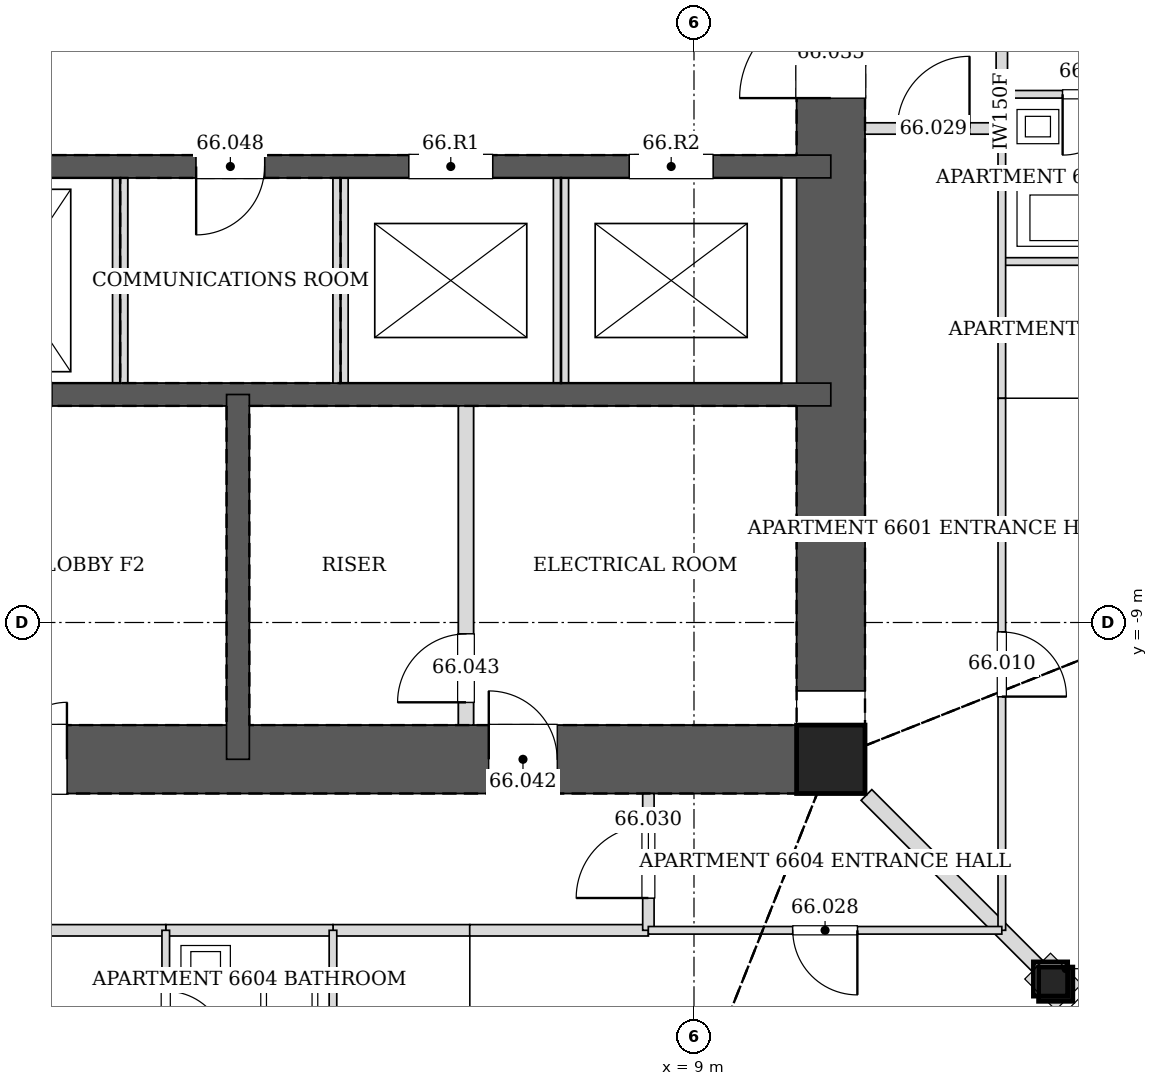
"""IFC4 building model, lengths in metres.
Left out: names, types, materials, properties, quantities, classifications, styles, units other than length and angle.
Written with IfcOpenShell. Run it as: python <this file> out.ifc"""

import sys

from ifc_helpers import new_model, si_unit, direction, frame, frame_2d, origin, origin_2d, place, context, subcontext, project, spatial, rectangle, hollow_rectangle, extrude, element, fill, save


model = new_model("IFC4")
c1 = context("Model", 3, precision=1e-05, world=origin(), true_north=direction((0.0, 1.0)))
c2 = subcontext(c1, "Body", "Model", "MODEL_VIEW")
j1 = project(units=[si_unit("LENGTHUNIT", "METRE"), si_unit("PLANEANGLEUNIT", "RADIAN")], contexts=[c1])
p1 = place(None, origin())
s1 = spatial("IfcSite", under=j1, at=p1, CompositionType="ELEMENT")
p2 = place(p1, origin())
s2 = spatial("IfcBuilding", under=s1, at=p2, CompositionType="ELEMENT")
p3 = place(p2, frame((0.0, 0.0, 274.2)))
s3 = spatial("IfcBuildingStorey", under=s2, at=p3, CompositionType="ELEMENT", Elevation=274.2)
p4 = place(p3, frame((13.759, -13.759, 0.0), z_axis=(-0.019953277583, 0.019953277583, 0.999601787427), x_axis=(-0.707106781187, -0.707106781187, 0.0)))
e1 = element("IfcColumn", 1, at=p4, inside=s3, PredefinedType="COLUMN", context=c2, shape_type="SweptSolid", body=[
    extrude(hollow_rectangle(XDim=0.45, YDim=0.45, WallThickness=0.02, at=origin_2d()), origin(), (0.0, 0.0, 1.0), 3.402),
])
p5 = place(p3, frame((10.8, -10.8, 0.0), z_axis=(0.0, 0.0, 1.0), x_axis=(1.0, 0.0, 0.0)))
e2 = element("IfcColumn", 2, at=p5, inside=s3, PredefinedType="COLUMN", context=c2, shape_type="SweptSolid", body=[
    extrude(hollow_rectangle(XDim=0.9, YDim=0.9, WallThickness=0.04, at=origin_2d()), origin(), (0.0, 0.0, 1.0), 3.4),
])
p6 = place(p3, frame((-10.8, -10.8, 0.0), z_axis=(0.0, 0.0, 1.0), x_axis=(1.0, 0.0, 0.0)))
e3 = element("IfcWall", 3, at=p6, inside=s3, PredefinedType="SOLIDWALL", context=c2, shape_type="SweptSolid", body=[
    extrude(rectangle(XDim=21.6, YDim=0.9, at=frame_2d((10.8, 0.0))), origin(), (0.0, 0.0, 1.0), 3.4),
])
p7 = place(p6, frame((10.05, 0.0, 0.0)))
e4 = element("IfcOpeningElement", 4, at=p7, cuts=e3, PredefinedType="OPENING", context=c2, shape_type="SweptSolid", body=[
    extrude(rectangle(XDim=1.5, YDim=2.1, at=frame_2d((0.75, 1.05))), frame((0.0, 0.46, 0.0), z_axis=(0.0, -1.0, 0.0), x_axis=(1.0, 0.0, 0.0)), (0.0, 0.0, 1.0), 0.92),
])
p8 = place(p6, frame((17.1, 0.0, 0.0)))
e5 = element("IfcOpeningElement", 5, at=p8, cuts=e3, PredefinedType="OPENING", context=c2, shape_type="SweptSolid", body=[
    extrude(rectangle(XDim=0.9, YDim=2.1, at=frame_2d((0.45, 1.05))), frame((0.0, 0.46, 0.0), z_axis=(0.0, -1.0, 0.0), x_axis=(1.0, 0.0, 0.0)), (0.0, 0.0, 1.0), 0.92),
])
p9 = place(p3, frame((10.8, -10.8, 0.0), z_axis=(0.0, 0.0, 1.0), x_axis=(0.0, 1.0, 0.0)))
e6 = element("IfcWall", 6, at=p9, inside=s3, PredefinedType="SOLIDWALL", context=c2, shape_type="SweptSolid", body=[
    extrude(rectangle(XDim=21.6, YDim=0.9, at=frame_2d((10.8, 0.0))), origin(), (0.0, 0.0, 1.0), 3.4),
])
p10 = place(p9, frame((11.7, 0.0, 0.0)))
e7 = element("IfcOpeningElement", 7, at=p10, cuts=e6, PredefinedType="OPENING", context=c2, shape_type="SweptSolid", body=[
    extrude(rectangle(XDim=1.2, YDim=2.1, at=frame_2d((0.6, 1.05))), frame((0.0, 0.46, 0.0), z_axis=(0.0, -1.0, 0.0), x_axis=(1.0, 0.0, 0.0)), (0.0, 0.0, 1.0), 0.92),
])
p11 = place(p9, frame((8.7, 0.0, 0.0)))
e8 = element("IfcOpeningElement", 8, at=p11, cuts=e6, PredefinedType="OPENING", context=c2, shape_type="SweptSolid", body=[
    extrude(rectangle(XDim=1.2, YDim=2.1, at=frame_2d((0.6, 1.05))), frame((0.0, 0.46, 0.0), z_axis=(0.0, -1.0, 0.0), x_axis=(1.0, 0.0, 0.0)), (0.0, 0.0, 1.0), 0.92),
])
p12 = place(p3, frame((-10.8, -3.0, 0.0), z_axis=(0.0, 0.0, 1.0), x_axis=(1.0, 0.0, 0.0)))
e9 = element("IfcWall", 9, at=p12, inside=s3, PredefinedType="SOLIDWALL", context=c2, shape_type="SweptSolid", body=[
    extrude(rectangle(XDim=21.6, YDim=0.3, at=frame_2d((10.8, 0.0))), origin(), (0.0, 0.0, 1.0), 3.4),
])
p13 = place(p12, frame((13.25, 0.0, 0.0)))
e10 = element("IfcOpeningElement", 10, at=p13, cuts=e9, PredefinedType="OPENING", context=c2, shape_type="SweptSolid", body=[
    extrude(rectangle(XDim=0.9, YDim=2.1, at=frame_2d((0.45, 1.05))), frame((0.0, 0.16, 0.0), z_axis=(0.0, -1.0, 0.0), x_axis=(1.0, 0.0, 0.0)), (0.0, 0.0, 1.0), 0.32),
])
p14 = place(p12, frame((1.65, 0.0, 0.0)))
e11 = element("IfcOpeningElement", 11, at=p14, cuts=e9, PredefinedType="OPENING", context=c2, shape_type="SweptSolid", body=[
    extrude(rectangle(XDim=0.9, YDim=2.1, at=frame_2d((0.45, 1.05))), frame((0.0, 0.16, 0.0), z_axis=(0.0, -1.0, 0.0), x_axis=(1.0, 0.0, 0.0)), (0.0, 0.0, 1.0), 0.32),
])
p15 = place(p12, frame((4.55, 0.0, 0.0)))
e12 = element("IfcOpeningElement", 12, at=p15, cuts=e9, PredefinedType="OPENING", context=c2, shape_type="SweptSolid", body=[
    extrude(rectangle(XDim=0.9, YDim=2.1, at=frame_2d((0.45, 1.05))), frame((0.0, 0.16, 0.0), z_axis=(0.0, -1.0, 0.0), x_axis=(1.0, 0.0, 0.0)), (0.0, 0.0, 1.0), 0.32),
])
p16 = place(p12, frame((7.45, 0.0, 0.0)))
e13 = element("IfcOpeningElement", 13, at=p16, cuts=e9, PredefinedType="OPENING", context=c2, shape_type="SweptSolid", body=[
    extrude(rectangle(XDim=0.9, YDim=2.1, at=frame_2d((0.45, 1.05))), frame((0.0, 0.16, 0.0), z_axis=(0.0, -1.0, 0.0), x_axis=(1.0, 0.0, 0.0)), (0.0, 0.0, 1.0), 0.32),
])
p17 = place(p12, frame((16.05, 0.0, 0.0)))
e14 = element("IfcOpeningElement", 14, at=p17, cuts=e9, PredefinedType="OPENING", context=c2, shape_type="SweptSolid", body=[
    extrude(rectangle(XDim=1.1, YDim=2.1, at=frame_2d((0.55, 1.05))), frame((0.0, 0.16, 0.0), z_axis=(0.0, -1.0, 0.0), x_axis=(1.0, 0.0, 0.0)), (0.0, 0.0, 1.0), 0.32),
])
p18 = place(p12, frame((18.95, 0.0, 0.0)))
e15 = element("IfcOpeningElement", 15, at=p18, cuts=e9, PredefinedType="OPENING", context=c2, shape_type="SweptSolid", body=[
    extrude(rectangle(XDim=1.1, YDim=2.1, at=frame_2d((0.55, 1.05))), frame((0.0, 0.16, 0.0), z_axis=(0.0, -1.0, 0.0), x_axis=(1.0, 0.0, 0.0)), (0.0, 0.0, 1.0), 0.32),
])
p19 = place(p3, frame((-10.8, -6.0, 0.0), z_axis=(0.0, 0.0, 1.0), x_axis=(1.0, 0.0, 0.0)))
e16 = element("IfcWall", 16, at=p19, inside=s3, PredefinedType="SOLIDWALL", context=c2, shape_type="SweptSolid", body=[
    extrude(rectangle(XDim=21.6, YDim=0.3, at=frame_2d((10.8, 0.0))), origin(), (0.0, 0.0, 1.0), 3.4),
])
p20 = place(p19, frame((10.25, 0.0, 0.0)))
e17 = element("IfcOpeningElement", 17, at=p20, cuts=e16, PredefinedType="OPENING", context=c2, shape_type="SweptSolid", body=[
    extrude(rectangle(XDim=1.1, YDim=2.1, at=frame_2d((0.55, 1.05))), frame((0.0, 0.16, 0.0), z_axis=(0.0, -1.0, 0.0), x_axis=(1.0, 0.0, 0.0)), (0.0, 0.0, 1.0), 0.32),
])
p21 = place(p3, frame((3.0, -6.0, 0.0), z_axis=(0.0, 0.0, 1.0), x_axis=(0.0, -1.0, 0.0)))
e18 = element("IfcWall", 18, at=p21, inside=s3, PredefinedType="SOLIDWALL", context=c2, shape_type="SweptSolid", body=[
    extrude(rectangle(XDim=4.8, YDim=0.3, at=frame_2d((2.4, 0.0))), origin(), (0.0, 0.0, 1.0), 3.4),
])
p22 = place(p3, frame((13.05, -2.5, 0.0), z_axis=(0.0, 0.0, 1.0), x_axis=(0.0, 1.0, 0.0)))
e19 = element("IfcWall", 19, at=p22, inside=s3, PredefinedType="PARTITIONING", context=c2, shape_type="SweptSolid", body=[
    extrude(rectangle(XDim=0.451, YDim=0.15, at=frame_2d((0.226, 0.0))), origin(), (0.0, 0.0, 1.0), 3.2),
])
p23 = place(p3, frame((13.05, -2.051, 0.0), z_axis=(0.0, 0.0, 1.0), x_axis=(0.0, 1.0, 0.0)))
e20 = element("IfcWall", 20, at=p23, inside=s3, PredefinedType="PARTITIONING", context=c2, shape_type="SweptSolid", body=[
    extrude(rectangle(XDim=9.602, YDim=0.15, at=frame_2d((4.801, 0.0))), origin(), (0.0, 0.0, 1.0), 2.344),
])
p24 = place(p3, frame((11.25, -2.5, 0.0), z_axis=(0.0, 0.0, 1.0), x_axis=(1.0, 0.0, 0.0)))
e21 = element("IfcWall", 21, at=p24, inside=s3, PredefinedType="PARTITIONING", context=c2, shape_type="SweptSolid", body=[
    extrude(rectangle(XDim=1.8, YDim=0.15, at=frame_2d((0.9, 0.0))), origin(), (0.0, 0.0, 1.0), 3.2),
])
p25 = place(p24, frame((0.425, 0.0, 0.0)))
e22 = element("IfcOpeningElement", 22, at=p25, cuts=e21, PredefinedType="OPENING", context=c2, shape_type="SweptSolid", body=[
    extrude(rectangle(XDim=0.95, YDim=2.1, at=frame_2d((0.475, 1.05))), frame((0.0, 0.085, 0.0), z_axis=(0.0, -1.0, 0.0), x_axis=(1.0, 0.0, 0.0)), (0.0, 0.0, 1.0), 0.17),
])
p26 = place(p3, frame((4.249, -13.05, 0.0), z_axis=(0.0, 0.0, 1.0), x_axis=(1.0, 0.0, 0.0)))
e23 = element("IfcWall", 23, at=p26, inside=s3, PredefinedType="PARTITIONING", context=c2, shape_type="SweptSolid", body=[
    extrude(rectangle(XDim=1.802, YDim=0.15, at=frame_2d((0.901, 0.0))), origin(), (0.0, 0.0, 1.0), 3.2),
])
p27 = place(p3, frame((2.049, -13.05, 0.0), z_axis=(0.0, 0.0, 1.0), x_axis=(1.0, 0.0, 0.0)))
e24 = element("IfcWall", 24, at=p27, inside=s3, PredefinedType="PARTITIONING", context=c2, shape_type="SweptSolid", body=[
    extrude(rectangle(XDim=2.202, YDim=0.15, at=frame_2d((1.101, 0.0))), origin(), (0.0, 0.0, 1.0), 3.2),
])
p28 = place(p3, frame((-7.551, -13.05, 0.0), z_axis=(0.0, 0.0, 1.0), x_axis=(1.0, 0.0, 0.0)))
e25 = element("IfcWall", 25, at=p28, inside=s3, PredefinedType="PARTITIONING", context=c2, shape_type="SweptSolid", body=[
    extrude(rectangle(XDim=9.602, YDim=0.15, at=frame_2d((4.801, 0.0))), origin(), (0.0, 0.0, 1.0), 2.344),
])
p29 = place(p3, frame((6.049, -13.05, 0.0), z_axis=(0.0, 0.0, 1.0), x_axis=(1.0, 0.0, 0.0)))
e26 = element("IfcWall", 26, at=p29, inside=s3, PredefinedType="PARTITIONING", context=c2, shape_type="SweptSolid", body=[
    extrude(rectangle(XDim=2.351, YDim=0.15, at=frame_2d((1.175, 0.0))), origin(), (0.0, 0.0, 1.0), 3.2),
])
p30 = place(p3, frame((8.4, -13.05, 0.0), z_axis=(0.0, 0.0, 1.0), x_axis=(0.0, 1.0, 0.0)))
e27 = element("IfcWall", 27, at=p30, inside=s3, PredefinedType="PARTITIONING", context=c2, shape_type="SweptSolid", body=[
    extrude(rectangle(XDim=1.8, YDim=0.15, at=frame_2d((0.9, 0.0))), origin(), (0.0, 0.0, 1.0), 3.2),
])
p31 = place(p30, frame((0.425, 0.0, 0.0)))
e28 = element("IfcOpeningElement", 28, at=p31, cuts=e27, PredefinedType="OPENING", context=c2, shape_type="SweptSolid", body=[
    extrude(rectangle(XDim=0.95, YDim=2.1, at=frame_2d((0.475, 1.05))), frame((0.0, 0.085, 0.0), z_axis=(0.0, -1.0, 0.0), x_axis=(1.0, 0.0, 0.0)), (0.0, 0.0, 1.0), 0.17),
])
p32 = place(p3, frame((15.45, -4.25, 0.0), z_axis=(0.0, 0.0, 1.0), x_axis=(-1.0, 0.0, 0.0)))
e29 = element("IfcWall", 29, at=p32, inside=s3, PredefinedType="PARTITIONING", context=c2, shape_type="SweptSolid", body=[
    extrude(rectangle(XDim=2.4, YDim=0.1, at=frame_2d((1.2, 0.0))), origin(), (0.0, 0.0, 1.0), 2.591),
])
p33 = place(p3, frame((13.05, -6.05, 0.0), z_axis=(0.0, 0.0, 1.0), x_axis=(0.0, 1.0, 0.0)))
e30 = element("IfcWall", 30, at=p33, inside=s3, PredefinedType="PARTITIONING", context=c2, shape_type="SweptSolid", body=[
    extrude(rectangle(XDim=3.551, YDim=0.1, at=frame_2d((1.775, 0.0))), origin(), (0.0, 0.0, 1.0), 3.2),
])
p34 = place(p3, frame((15.45, -2.05, 0.0), z_axis=(0.0, 0.0, 1.0), x_axis=(-1.0, 0.0, 0.0)))
e31 = element("IfcWall", 31, at=p34, inside=s3, PredefinedType="PARTITIONING", context=c2, shape_type="SweptSolid", body=[
    extrude(rectangle(XDim=2.4, YDim=0.1, at=frame_2d((1.2, 0.0))), origin(), (0.0, 0.0, 1.0), 2.591),
])
p35 = place(p34, frame((0.8, 0.0, 0.0)))
e32 = element("IfcOpeningElement", 32, at=p35, cuts=e31, PredefinedType="OPENING", context=c2, shape_type="SweptSolid", body=[
    extrude(rectangle(XDim=0.8, YDim=2.1, at=frame_2d((0.4, 1.05))), frame((0.0, 0.06, 0.0), z_axis=(0.0, -1.0, 0.0), x_axis=(1.0, 0.0, 0.0)), (0.0, 0.0, 1.0), 0.12),
])
p36 = place(p3, frame((13.518, -13.518, 0.0), z_axis=(0.0, 0.0, 1.0), x_axis=(-0.707106781187, 0.707106781187, 0.0)))
e33 = element("IfcWall", 33, at=p36, inside=s3, PredefinedType="PARTITIONING", context=c2, shape_type="SweptSolid", body=[
    extrude(rectangle(XDim=3.181, YDim=0.2, at=frame_2d((1.59, 0.0))), origin(), (0.0, 0.0, 1.0), 2.591),
])
p37 = place(p3, frame((13.05, -6.05, 0.0), z_axis=(0.0, 0.0, 1.0), x_axis=(0.0, -1.0, 0.0)))
e34 = element("IfcWall", 34, at=p37, inside=s3, PredefinedType="PARTITIONING", context=c2, shape_type="SweptSolid", body=[
    extrude(rectangle(XDim=7.0, YDim=0.1, at=frame_2d((3.5, 0.0))), origin(), (0.0, 0.0, 1.0), 2.428),
])
p38 = place(p37, frame((3.075, 0.0, 0.0)))
e35 = element("IfcOpeningElement", 35, at=p38, cuts=e34, PredefinedType="OPENING", context=c2, shape_type="SweptSolid", body=[
    extrude(rectangle(XDim=0.85, YDim=2.1, at=frame_2d((0.425, 1.05))), frame((0.0, 0.06, 0.0), z_axis=(0.0, -1.0, 0.0), x_axis=(1.0, 0.0, 0.0)), (0.0, 0.0, 1.0), 0.12),
])
p39 = place(p3, frame((4.25, -13.05, 0.0), z_axis=(0.0, 0.0, 1.0), x_axis=(0.0, -1.0, 0.0)))
e36 = element("IfcWall", 36, at=p39, inside=s3, PredefinedType="PARTITIONING", context=c2, shape_type="SweptSolid", body=[
    extrude(rectangle(XDim=2.4, YDim=0.1, at=frame_2d((1.2, 0.0))), origin(), (0.0, 0.0, 1.0), 2.591),
])
p40 = place(p3, frame((2.05, -13.05, 0.0), z_axis=(0.0, 0.0, 1.0), x_axis=(0.0, -1.0, 0.0)))
e37 = element("IfcWall", 37, at=p40, inside=s3, PredefinedType="PARTITIONING", context=c2, shape_type="SweptSolid", body=[
    extrude(rectangle(XDim=2.4, YDim=0.1, at=frame_2d((1.2, 0.0))), origin(), (0.0, 0.0, 1.0), 2.591),
])
p41 = place(p40, frame((0.8, 0.0, 0.0)))
e38 = element("IfcOpeningElement", 38, at=p41, cuts=e37, PredefinedType="OPENING", context=c2, shape_type="SweptSolid", body=[
    extrude(rectangle(XDim=0.8, YDim=2.1, at=frame_2d((0.4, 1.05))), frame((0.0, 0.06, 0.0), z_axis=(0.0, -1.0, 0.0), x_axis=(1.0, 0.0, 0.0)), (0.0, 0.0, 1.0), 0.12),
])
p42 = place(p3, frame((13.05, -13.05, 0.0), z_axis=(0.0, 0.0, 1.0), x_axis=(-1.0, 0.0, 0.0)))
e39 = element("IfcWall", 39, at=p42, inside=s3, PredefinedType="PARTITIONING", context=c2, shape_type="SweptSolid", body=[
    extrude(rectangle(XDim=4.651, YDim=0.1, at=frame_2d((2.326, 0.0))), origin(), (0.0, 0.0, 1.0), 2.428),
])
p43 = place(p42, frame((1.9, 0.0, 0.0)))
e40 = element("IfcOpeningElement", 40, at=p43, cuts=e39, PredefinedType="OPENING", context=c2, shape_type="SweptSolid", body=[
    extrude(rectangle(XDim=0.85, YDim=2.1, at=frame_2d((0.425, 1.05))), frame((0.0, 0.06, 0.0), z_axis=(0.0, -1.0, 0.0), x_axis=(1.0, 0.0, 0.0)), (0.0, 0.0, 1.0), 0.12),
])
for number, where, z_axis, x_axis in (
    (41, (1.45, -5.85, 0.0), (0.0, 0.0, 1.0), (0.0, 1.0, 0.0)),
    (42, (4.35, -5.85, 0.0), (0.0, 0.0, 1.0), (0.0, 1.0, 0.0)),
):
    element("IfcWall", number, at=place(p3, frame(where, z_axis=z_axis, x_axis=x_axis)), inside=s3, PredefinedType="PARTITIONING", context=c2, shape_type="SweptSolid", body=[
        extrude(rectangle(XDim=2.7, YDim=0.2, at=frame_2d((1.35, 0.0))), origin(), (0.0, 0.0, 1.0), 3.2),
    ])
p44 = place(p3, frame((7.25, -5.85, 0.0), z_axis=(0.0, 0.0, 1.0), x_axis=(0.0, 1.0, 0.0)))
e43 = element("IfcWall", 43, at=p44, inside=s3, PredefinedType="PARTITIONING", context=c2, shape_type="SweptSolid", body=[
    extrude(rectangle(XDim=2.7, YDim=0.2, at=frame_2d((1.35, 0.0))), origin(), (0.0, 0.0, 1.0), 3.4),
])
p45 = place(p3, frame((6.0, -10.35, 0.0), z_axis=(0.0, 0.0, 1.0), x_axis=(0.0, 1.0, 0.0)))
e44 = element("IfcWall", 44, at=p45, inside=s3, PredefinedType="PARTITIONING", context=c2, shape_type="SweptSolid", body=[
    extrude(rectangle(XDim=4.2, YDim=0.2, at=frame_2d((2.1, 0.0))), origin(), (0.0, 0.0, 1.0), 3.2),
])
p46 = place(p45, frame((0.3, 0.0, 0.0)))
e45 = element("IfcOpeningElement", 45, at=p46, cuts=e44, PredefinedType="OPENING", context=c2, shape_type="SweptSolid", body=[
    extrude(rectangle(XDim=0.9, YDim=2.1, at=frame_2d((0.45, 1.05))), frame((0.0, 0.11, 0.0), z_axis=(0.0, -1.0, 0.0), x_axis=(1.0, 0.0, 0.0)), (0.0, 0.0, 1.0), 0.22),
])
p47 = place(p35, origin())
e46 = element("IfcDoor", 46, at=p47, inside=s3, OperationType="SINGLE_SWING_RIGHT", PredefinedType="DOOR", context=c2, shape_type="SweptSolid", body=[
    extrude(rectangle(XDim=0.8, YDim=2.1, at=frame_2d((0.4, 1.05))), frame((0.0, 0.025, 0.0), z_axis=(0.0, -1.0, 0.0), x_axis=(1.0, 0.0, 0.0)), (0.0, 0.0, 1.0), 0.05),
])
fill(e32, e46)
p48 = place(p38, origin())
e47 = element("IfcDoor", 47, at=p48, inside=s3, OperationType="SINGLE_SWING_RIGHT", PredefinedType="DOOR", context=c2, shape_type="SweptSolid", body=[
    extrude(rectangle(XDim=0.85, YDim=2.1, at=frame_2d((0.425, 1.05))), frame((0.0, 0.025, 0.0), z_axis=(0.0, -1.0, 0.0), x_axis=(1.0, 0.0, 0.0)), (0.0, 0.0, 1.0), 0.05),
])
fill(e35, e47)
p49 = place(p41, origin())
e48 = element("IfcDoor", 48, at=p49, inside=s3, OperationType="SINGLE_SWING_RIGHT", PredefinedType="DOOR", context=c2, shape_type="SweptSolid", body=[
    extrude(rectangle(XDim=0.8, YDim=2.1, at=frame_2d((0.4, 1.05))), frame((0.0, 0.025, 0.0), z_axis=(0.0, -1.0, 0.0), x_axis=(1.0, 0.0, 0.0)), (0.0, 0.0, 1.0), 0.05),
])
fill(e38, e48)
p50 = place(p43, origin())
e49 = element("IfcDoor", 49, at=p50, inside=s3, OperationType="SINGLE_SWING_LEFT", PredefinedType="DOOR", context=c2, shape_type="SweptSolid", body=[
    extrude(rectangle(XDim=0.85, YDim=2.1, at=frame_2d((0.425, 1.05))), frame((0.0, 0.025, 0.0), z_axis=(0.0, -1.0, 0.0), x_axis=(1.0, 0.0, 0.0)), (0.0, 0.0, 1.0), 0.05),
])
fill(e40, e49)
p51 = place(p25, origin())
e50 = element("IfcDoor", 50, at=p51, inside=s3, OperationType="SINGLE_SWING_RIGHT", PredefinedType="DOOR", context=c2, shape_type="SweptSolid", body=[
    extrude(rectangle(XDim=0.95, YDim=2.1, at=frame_2d((0.475, 1.05))), frame((0.0, 0.025, 0.0), z_axis=(0.0, -1.0, 0.0), x_axis=(1.0, 0.0, 0.0)), (0.0, 0.0, 1.0), 0.05),
])
fill(e22, e50)
p52 = place(p31, origin())
e51 = element("IfcDoor", 51, at=p52, inside=s3, OperationType="SINGLE_SWING_LEFT", PredefinedType="DOOR", context=c2, shape_type="SweptSolid", body=[
    extrude(rectangle(XDim=0.95, YDim=2.1, at=frame_2d((0.475, 1.05))), frame((0.0, 0.025, 0.0), z_axis=(0.0, -1.0, 0.0), x_axis=(1.0, 0.0, 0.0)), (0.0, 0.0, 1.0), 0.05),
])
fill(e28, e51)
p53 = place(p11, origin())
e52 = element("IfcDoor", 52, at=p53, inside=s3, OperationType="SINGLE_SWING_LEFT", PredefinedType="DOOR", context=c2, shape_type="SweptSolid", body=[
    extrude(rectangle(XDim=1.2, YDim=2.1, at=frame_2d((0.6, 1.05))), frame((0.0, 0.025, 0.0), z_axis=(0.0, -1.0, 0.0), x_axis=(1.0, 0.0, 0.0)), (0.0, 0.0, 1.0), 0.05),
])
fill(e8, e52)
p54 = place(p7, origin())
e53 = element("IfcDoor", 53, at=p54, inside=s3, OperationType="DOUBLE_DOOR_SINGLE_SWING", PredefinedType="DOOR", context=c2, shape_type="SweptSolid", body=[
    extrude(rectangle(XDim=1.5, YDim=2.1, at=frame_2d((0.75, 1.05))), frame((0.0, 0.025, 0.0), z_axis=(0.0, -1.0, 0.0), x_axis=(1.0, 0.0, 0.0)), (0.0, 0.0, 1.0), 0.05),
])
fill(e4, e53)
p55 = place(p8, origin())
e54 = element("IfcDoor", 54, at=p55, inside=s3, OperationType="SINGLE_SWING_LEFT", PredefinedType="DOOR", context=c2, shape_type="SweptSolid", body=[
    extrude(rectangle(XDim=0.9, YDim=2.1, at=frame_2d((0.45, 1.05))), frame((0.0, 0.025, 0.0), z_axis=(0.0, -1.0, 0.0), x_axis=(1.0, 0.0, 0.0)), (0.0, 0.0, 1.0), 0.05),
])
fill(e5, e54)
p56 = place(p46, origin())
e55 = element("IfcDoor", 55, at=p56, inside=s3, OperationType="SINGLE_SWING_LEFT", PredefinedType="DOOR", context=c2, shape_type="SweptSolid", body=[
    extrude(rectangle(XDim=0.9, YDim=2.1, at=frame_2d((0.45, 1.05))), frame((0.0, 0.025, 0.0), z_axis=(0.0, -1.0, 0.0), x_axis=(1.0, 0.0, 0.0)), (0.0, 0.0, 1.0), 0.05),
])
fill(e45, e55)
p57 = place(p13, frame((0.9, 0.0, 0.0), z_axis=(0.0, 0.0, 1.0), x_axis=(-1.0, 0.0, 0.0)))
e56 = element("IfcDoor", 56, at=p57, inside=s3, OperationType="SINGLE_SWING_RIGHT", PredefinedType="DOOR", context=c2, shape_type="SweptSolid", body=[
    extrude(rectangle(XDim=0.9, YDim=2.1, at=frame_2d((0.45, 1.05))), frame((0.0, 0.025, 0.0), z_axis=(0.0, -1.0, 0.0), x_axis=(1.0, 0.0, 0.0)), (0.0, 0.0, 1.0), 0.05),
])
fill(e10, e56)
p58 = place(p17, origin())
e57 = element("IfcDoor", 57, at=p58, inside=s3, OperationType="DOUBLE_DOOR_SLIDING", PredefinedType="DOOR", context=c2, shape_type="SweptSolid", body=[
    extrude(rectangle(XDim=1.1, YDim=2.1, at=frame_2d((0.55, 1.05))), frame((0.0, 0.025, 0.0), z_axis=(0.0, -1.0, 0.0), x_axis=(1.0, 0.0, 0.0)), (0.0, 0.0, 1.0), 0.05),
])
fill(e14, e57)
p59 = place(p18, origin())
e58 = element("IfcDoor", 58, at=p59, inside=s3, OperationType="DOUBLE_DOOR_SLIDING", PredefinedType="DOOR", context=c2, shape_type="SweptSolid", body=[
    extrude(rectangle(XDim=1.1, YDim=2.1, at=frame_2d((0.55, 1.05))), frame((0.0, 0.025, 0.0), z_axis=(0.0, -1.0, 0.0), x_axis=(1.0, 0.0, 0.0)), (0.0, 0.0, 1.0), 0.05),
])
fill(e15, e58)
save(model, sys.argv[1])
